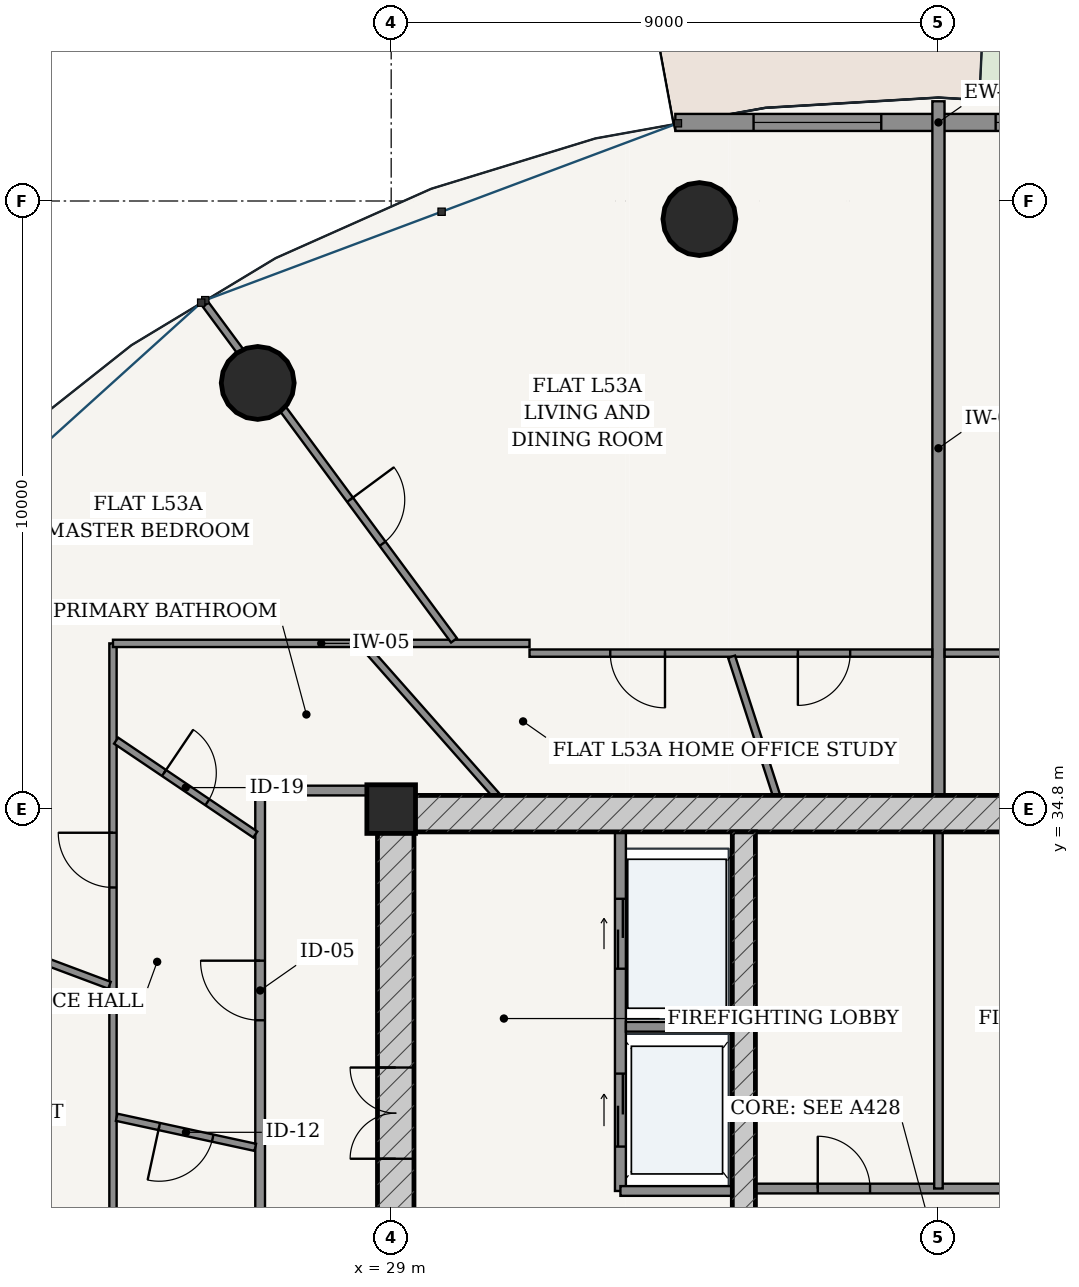
"""IFC4 building model, lengths in metres.
Left out: names, types, materials, properties, quantities, classifications, styles, units other than length and angle.
Written with IfcOpenShell. Run it as: python <this file> out.ifc"""

import sys

from ifc_helpers import new_model, si_unit, direction, frame, frame_2d, origin, origin_2d, place, context, subcontext, project, spatial, rectangle, hollow_circle, extrude, source, transform, mapped, element, fill, save


model = new_model("IFC4")
c1 = context("Model", 3, precision=1e-05, world=origin(), true_north=direction((-0.2419218956, 0.970295726276)))
c2 = subcontext(c1, "Body", "Model", "MODEL_VIEW")
j1 = project(units=[si_unit("LENGTHUNIT", "METRE"), si_unit("PLANEANGLEUNIT", "RADIAN")], contexts=[c1])
p1 = place(None, origin())
s1 = spatial("IfcSite", under=j1, at=p1, CompositionType="ELEMENT")
p2 = place(p1, origin())
s2 = spatial("IfcBuilding", under=s1, at=p2, CompositionType="ELEMENT")
p3 = place(p2, frame((0.0, 0.0, 202.3)))
s3 = spatial("IfcBuildingStorey", under=s2, at=p3, CompositionType="ELEMENT", Elevation=202.3)
p4 = place(p3, frame((29.0, 34.8, 0.0), z_axis=(0.0, 0.0, 1.0), x_axis=(1.0, 0.0, 0.0)))
e1 = element("IfcColumn", 1, at=p4, inside=s3, PredefinedType="COLUMN", context=c2, shape_type="SweptSolid", body=[
    extrude(rectangle(XDim=0.8, YDim=0.8, at=origin_2d()), origin(), (0.0, 0.0, 1.0), 3.7),
])
p5 = place(p3, frame((28.775, 34.725, 0.0), z_axis=(0.0, 0.0, 1.0), x_axis=(1.0, 0.0, 0.0)))
e2 = element("IfcWall", 2, at=p5, inside=s3, PredefinedType="SHEAR", context=c2, shape_type="SweptSolid", body=[
    extrude(rectangle(XDim=18.45, YDim=0.6, at=frame_2d((9.225, 0.0))), origin(), (0.0, 0.0, 1.0), 3.435),
])
p6 = place(p3, frame((29.075, 19.175, 0.0), z_axis=(0.0, 0.0, 1.0), x_axis=(0.0, 1.0, 0.0)))
e3 = element("IfcWall", 3, at=p6, inside=s3, PredefinedType="SHEAR", context=c2, shape_type="SweptSolid", body=[
    extrude(rectangle(XDim=15.25, YDim=0.6, at=frame_2d((7.625, 0.0))), origin(), (0.0, 0.0, 1.0), 3.435),
])
p7 = place(p6, frame((9.875, 0.0, 0.0)))
e4 = element("IfcOpeningElement", 4, at=p7, cuts=e3, PredefinedType="OPENING", context=c2, shape_type="SweptSolid", body=[
    extrude(rectangle(XDim=1.5, YDim=2.2, at=frame_2d((0.75, 1.1))), frame((0.0, 0.31, 0.0), z_axis=(0.0, -1.0, 0.0), x_axis=(1.0, 0.0, 0.0)), (0.0, 0.0, 1.0), 0.62),
])
p8 = place(p3, frame((34.8, 19.175, 0.0), z_axis=(0.0, 0.0, 1.0), x_axis=(0.0, 1.0, 0.0)))
e5 = element("IfcWall", 5, at=p8, inside=s3, PredefinedType="SHEAR", context=c2, shape_type="SweptSolid", body=[
    extrude(rectangle(XDim=15.25, YDim=0.38, at=frame_2d((7.625, 0.0))), origin(), (0.0, 0.0, 1.0), 3.435),
])
p9 = place(p8, frame((7.8, 0.0, 0.0)))
e6 = element("IfcOpeningElement", 6, at=p9, cuts=e5, PredefinedType="OPENING", context=c2, shape_type="SweptSolid", body=[
    extrude(rectangle(XDim=1.05, YDim=2.15, at=frame_2d((0.525, 1.075))), frame((0.0, 0.2, 0.0), z_axis=(0.0, -1.0, 0.0), x_axis=(1.0, 0.0, 0.0)), (0.0, 0.0, 1.0), 0.4),
])
for number, where, z_axis, x_axis in (
    (7, (34.069, 44.503, 0.0), (0.0, 0.0, 1.0), (1.0, 0.0, 0.0)),
    (8, (26.805, 41.808, 0.0), (0.0, 0.0, 1.0), (1.0, 0.0, 0.0)),
):
    element("IfcColumn", number, at=place(p3, frame(where, z_axis=z_axis, x_axis=x_axis)), inside=s3, PredefinedType="COLUMN", context=c2, shape_type="SweptSolid", body=[
        extrude(hollow_circle(Radius=0.6, WallThickness=0.038, at=origin_2d()), origin(), (0.0, 0.0, 1.0), 3.7),
    ])
p10 = place(p3, frame((42.327, 46.092, 0.0), z_axis=(0.0, 0.0, 1.0), x_axis=(-1.0, 0.0, 0.0)))
e9 = element("IfcWall", 9, at=p10, inside=s3, PredefinedType="SOLIDWALL", context=c2, shape_type="SweptSolid", body=[
    extrude(rectangle(XDim=8.654, YDim=0.28, at=frame_2d((4.327, 0.0))), origin(), (0.0, 0.0, 1.0), 3.435),
])
p11 = place(p10, frame((1.287, 0.0, 0.85)))
e10 = element("IfcOpeningElement", 10, at=p11, cuts=e9, PredefinedType="OPENING", context=c2, shape_type="SweptSolid", body=[
    extrude(rectangle(XDim=2.1, YDim=1.95, at=frame_2d((1.05, 0.975))), frame((0.0, 0.15, 0.0), z_axis=(0.0, -1.0, 0.0), x_axis=(1.0, 0.0, 0.0)), (0.0, 0.0, 1.0), 0.3),
])
p12 = place(p10, frame((5.268, 0.0, 0.85)))
e11 = element("IfcOpeningElement", 11, at=p12, cuts=e9, PredefinedType="OPENING", context=c2, shape_type="SweptSolid", body=[
    extrude(rectangle(XDim=2.1, YDim=1.95, at=frame_2d((1.05, 0.975))), frame((0.0, 0.15, 0.0), z_axis=(0.0, -1.0, 0.0), x_axis=(1.0, 0.0, 0.0)), (0.0, 0.0, 1.0), 0.3),
])
p13 = place(p3, frame((32.77, 28.52, 0.0), z_axis=(0.0, 0.0, 1.0), x_axis=(0.0, 1.0, 0.0)))
e12 = element("IfcWall", 12, at=p13, inside=s3, PredefinedType="PARTITIONING", context=c2, shape_type="SweptSolid", body=[
    extrude(rectangle(XDim=5.905, YDim=0.18, at=frame_2d((2.953, 0.0))), origin(), (0.0, 0.0, 1.0), 3.435),
])
p14 = place(p13, frame((3.655, 0.0, 0.0)))
e13 = element("IfcOpeningElement", 13, at=p14, cuts=e12, PredefinedType="OPENING", context=c2, shape_type="SweptSolid", body=[
    extrude(rectangle(XDim=1.15, YDim=2.2, at=frame_2d((0.575, 1.1))), frame((0.0, 0.1, 0.0), z_axis=(0.0, -1.0, 0.0), x_axis=(1.0, 0.0, 0.0)), (0.0, 0.0, 1.0), 0.2),
])
p15 = place(p13, frame((0.73, 0.0, 0.0)))
e14 = element("IfcOpeningElement", 14, at=p15, cuts=e12, PredefinedType="OPENING", context=c2, shape_type="SweptSolid", body=[
    extrude(rectangle(XDim=1.2, YDim=2.25, at=frame_2d((0.6, 1.125))), frame((0.0, 0.1, 0.0), z_axis=(0.0, -1.0, 0.0), x_axis=(1.0, 0.0, 0.0)), (0.0, 0.0, 1.0), 0.2),
])
p16 = place(p3, frame((32.86, 31.22, 0.0), z_axis=(0.0, 0.0, 1.0), x_axis=(1.0, 0.0, 0.0)))
e15 = element("IfcWall", 15, at=p16, inside=s3, PredefinedType="PARTITIONING", context=c2, shape_type="SweptSolid", body=[
    extrude(rectangle(XDim=1.75, YDim=0.16, at=frame_2d((0.875, 0.0))), origin(), (0.0, 0.0, 1.0), 3.435),
])
p17 = place(p3, frame((32.77, 28.52, 0.0), z_axis=(0.0, 0.0, 1.0), x_axis=(1.0, 0.0, 0.0)))
e16 = element("IfcWall", 16, at=p17, inside=s3, PredefinedType="PARTITIONING", context=c2, shape_type="SweptSolid", body=[
    extrude(rectangle(XDim=1.84, YDim=0.16, at=frame_2d((0.92, 0.0))), origin(), (0.0, 0.0, 1.0), 3.435),
])
p18 = place(p3, frame((34.99, 28.56, 0.0), z_axis=(0.0, 0.0, 1.0), x_axis=(1.0, 0.0, 0.0)))
e17 = element("IfcWall", 17, at=p18, inside=s3, PredefinedType="PARTITIONING", context=c2, shape_type="SweptSolid", body=[
    extrude(rectangle(XDim=6.02, YDim=0.16, at=frame_2d((3.01, 0.0))), origin(), (0.0, 0.0, 1.0), 3.435),
])
p19 = place(p18, frame((1.025, 0.0, 0.0)))
e18 = element("IfcOpeningElement", 18, at=p19, cuts=e17, PredefinedType="OPENING", context=c2, shape_type="SweptSolid", body=[
    extrude(rectangle(XDim=0.86, YDim=2.1, at=frame_2d((0.43, 1.05))), frame((0.0, 0.09, 0.0), z_axis=(0.0, -1.0, 0.0), x_axis=(1.0, 0.0, 0.0)), (0.0, 0.0, 1.0), 0.18),
])
p20 = place(p18, frame((4.14, 0.0, 0.0)))
e19 = element("IfcOpeningElement", 19, at=p20, cuts=e17, PredefinedType="OPENING", context=c2, shape_type="SweptSolid", body=[
    extrude(rectangle(XDim=0.85, YDim=2.1, at=frame_2d((0.425, 1.05))), frame((0.0, 0.09, 0.0), z_axis=(0.0, -1.0, 0.0), x_axis=(1.0, 0.0, 0.0)), (0.0, 0.0, 1.0), 0.18),
])
p21 = place(p3, frame((38.0, 28.56, 0.0), z_axis=(0.0, 0.0, 1.0), x_axis=(0.0, 1.0, 0.0)))
e20 = element("IfcWall", 20, at=p21, inside=s3, PredefinedType="PARTITIONING", context=c2, shape_type="SweptSolid", body=[
    extrude(rectangle(XDim=5.865, YDim=0.14, at=frame_2d((2.933, 0.0))), origin(), (0.0, 0.0, 1.0), 3.435),
])
p22 = place(p3, frame((26.845, 24.4, 0.0), z_axis=(0.0, 0.0, 1.0), x_axis=(0.0, 1.0, 0.0)))
e21 = element("IfcWall", 21, at=p22, inside=s3, PredefinedType="PARTITIONING", context=c2, shape_type="SweptSolid", body=[
    extrude(rectangle(XDim=10.625, YDim=0.16, at=frame_2d((5.312, 0.0))), origin(), (0.0, 0.0, 1.0), 2.951),
])
p23 = place(p22, frame((6.927, 0.0, 0.0)))
e22 = element("IfcOpeningElement", 22, at=p23, cuts=e21, PredefinedType="OPENING", context=c2, shape_type="SweptSolid", body=[
    extrude(rectangle(XDim=0.98, YDim=2.2, at=frame_2d((0.49, 1.1))), frame((0.0, 0.09, 0.0), z_axis=(0.0, -1.0, 0.0), x_axis=(1.0, 0.0, 0.0)), (0.0, 0.0, 1.0), 0.18),
])
p24 = place(p3, frame((26.845, 35.105, 0.0), z_axis=(0.0, 0.0, 1.0), x_axis=(1.0, 0.0, 0.0)))
e23 = element("IfcWall", 23, at=p24, inside=s3, PredefinedType="PARTITIONING", context=c2, shape_type="SweptSolid", body=[
    extrude(rectangle(XDim=1.93, YDim=0.16, at=frame_2d((0.965, 0.0))), origin(), (0.0, 0.0, 1.0), 3.435),
])
p25 = place(p3, frame((38.0, 35.027, 0.0), z_axis=(0.0, 0.0, 1.0), x_axis=(0.0, 1.0, 0.0)))
e24 = element("IfcWall", 24, at=p25, inside=s3, PredefinedType="PARTITIONING", context=c2, shape_type="SweptSolid", body=[
    extrude(rectangle(XDim=11.413, YDim=0.2, at=frame_2d((5.707, 0.0))), origin(), (0.0, 0.0, 1.0), 2.52),
])
p26 = place(p3, frame((24.425, 21.9, 0.0), z_axis=(0.0, 0.0, 1.0), x_axis=(0.0, 1.0, 0.0)))
e25 = element("IfcWall", 25, at=p26, inside=s3, PredefinedType="PARTITIONING", context=c2, shape_type="SweptSolid", body=[
    extrude(rectangle(XDim=15.625, YDim=0.12, at=frame_2d((7.812, 0.0))), origin(), (0.0, 0.0, 1.0), 2.951),
])
p27 = place(p26, frame((11.611, 0.0, 0.0)))
e26 = element("IfcOpeningElement", 26, at=p27, cuts=e25, PredefinedType="OPENING", context=c2, shape_type="SweptSolid", body=[
    extrude(rectangle(XDim=0.9, YDim=2.15, at=frame_2d((0.45, 1.075))), frame((0.0, 0.07, 0.0), z_axis=(0.0, -1.0, 0.0), x_axis=(1.0, 0.0, 0.0)), (0.0, 0.0, 1.0), 0.14),
])
p28 = place(p3, frame((24.425, 37.525, 0.0), z_axis=(0.0, 0.0, 1.0), x_axis=(1.0, 0.0, 0.0)))
e27 = element("IfcWall", 27, at=p28, inside=s3, PredefinedType="PARTITIONING", context=c2, shape_type="SweptSolid", body=[
    extrude(rectangle(XDim=6.85, YDim=0.12, at=frame_2d((3.425, 0.0))), origin(), (0.0, 0.0, 1.0), 2.951),
])
p29 = place(p3, frame((31.275, 37.365, 0.0), z_axis=(0.0, 0.0, 1.0), x_axis=(1.0, 0.0, 0.0)))
e28 = element("IfcWall", 28, at=p29, inside=s3, PredefinedType="PARTITIONING", context=c2, shape_type="SweptSolid", body=[
    extrude(rectangle(XDim=6.623, YDim=0.12, at=frame_2d((3.312, 0.0))), origin(), (0.0, 0.0, 1.0), 2.951),
])
p30 = place(p29, frame((4.413, 0.0, 0.0)))
e29 = element("IfcOpeningElement", 29, at=p30, cuts=e28, PredefinedType="OPENING", context=c2, shape_type="SweptSolid", body=[
    extrude(rectangle(XDim=0.86, YDim=2.15, at=frame_2d((0.43, 1.075))), frame((0.0, 0.07, 0.0), z_axis=(0.0, -1.0, 0.0), x_axis=(1.0, 0.0, 0.0)), (0.0, 0.0, 1.0), 0.14),
])
p31 = place(p29, frame((1.328, 0.0, 0.0)))
e30 = element("IfcOpeningElement", 30, at=p31, cuts=e28, PredefinedType="OPENING", context=c2, shape_type="SweptSolid", body=[
    extrude(rectangle(XDim=0.9, YDim=2.15, at=frame_2d((0.45, 1.075))), frame((0.0, 0.07, 0.0), z_axis=(0.0, -1.0, 0.0), x_axis=(1.0, 0.0, 0.0)), (0.0, 0.0, 1.0), 0.14),
])
p32 = place(p3, frame((30.033, 37.575, 0.0), z_axis=(0.0, 0.0, 1.0), x_axis=(-0.59452500855, 0.804077119565, 0.0)))
e31 = element("IfcWall", 31, at=p32, inside=s3, PredefinedType="PARTITIONING", context=c2, shape_type="SweptSolid", body=[
    extrude(rectangle(XDim=6.867, YDim=0.12, at=frame_2d((3.434, 0.0))), origin(), (0.0, 0.0, 1.0), 2.951),
])
p33 = place(p32, frame((1.976, 0.0, 0.0)))
e32 = element("IfcOpeningElement", 32, at=p33, cuts=e31, PredefinedType="OPENING", context=c2, shape_type="SweptSolid", body=[
    extrude(rectangle(XDim=0.9, YDim=2.15, at=frame_2d((0.45, 1.075))), frame((0.0, 0.07, 0.0), z_axis=(0.0, -1.0, 0.0), x_axis=(1.0, 0.0, 0.0)), (0.0, 0.0, 1.0), 0.14),
])
p34 = place(p3, frame((24.367, 31.903, 0.0), z_axis=(0.0, 0.0, 1.0), x_axis=(-0.936544604529, 0.350548432785, 0.0)))
e33 = element("IfcWall", 33, at=p34, inside=s3, PredefinedType="PARTITIONING", context=c2, shape_type="SweptSolid", body=[
    extrude(rectangle(XDim=6.887, YDim=0.12, at=frame_2d((3.444, 0.0))), origin(), (0.0, 0.0, 1.0), 2.951),
])
p35 = place(p34, frame((2.994, 0.0, 0.0)))
e34 = element("IfcOpeningElement", 34, at=p35, cuts=e33, PredefinedType="OPENING", context=c2, shape_type="SweptSolid", body=[
    extrude(rectangle(XDim=0.9, YDim=2.15, at=frame_2d((0.45, 1.075))), frame((0.0, 0.07, 0.0), z_axis=(0.0, -1.0, 0.0), x_axis=(1.0, 0.0, 0.0)), (0.0, 0.0, 1.0), 0.14),
])
p36 = place(p3, frame((35.336, 35.027, 0.0), z_axis=(0.0, 0.0, 1.0), x_axis=(-0.308083476138, 0.951359328398, 0.0)))
e35 = element("IfcWall", 35, at=p36, inside=s3, PredefinedType="PARTITIONING", context=c2, shape_type="SweptSolid", body=[
    extrude(rectangle(XDim=2.396, YDim=0.12, at=frame_2d((1.198, 0.0))), origin(), (0.0, 0.0, 1.0), 2.52),
])
p37 = place(p3, frame((30.726, 35.027, 0.0), z_axis=(0.0, 0.0, 1.0), x_axis=(-0.662398427862, 0.749151735475, 0.0)))
e36 = element("IfcWall", 36, at=p37, inside=s3, PredefinedType="PARTITIONING", context=c2, shape_type="SweptSolid", body=[
    extrude(rectangle(XDim=3.273, YDim=0.12, at=frame_2d((1.636, 0.0))), origin(), (0.0, 0.0, 1.0), 3.435),
])
p38 = place(p3, frame((26.765, 34.381, 0.0), z_axis=(0.0, 0.0, 1.0), x_axis=(-0.828908126494, 0.55938476725, 0.0)))
e37 = element("IfcWall", 37, at=p38, inside=s3, PredefinedType="PARTITIONING", context=c2, shape_type="SweptSolid", body=[
    extrude(rectangle(XDim=2.761, YDim=0.12, at=frame_2d((1.38, 0.0))), origin(), (0.0, 0.0, 1.0), 3.11),
])
p39 = place(p38, frame((0.95, 0.0, 0.0)))
e38 = element("IfcOpeningElement", 38, at=p39, cuts=e37, PredefinedType="OPENING", context=c2, shape_type="SweptSolid", body=[
    extrude(rectangle(XDim=0.86, YDim=2.15, at=frame_2d((0.43, 1.075))), frame((0.0, 0.07, 0.0), z_axis=(0.0, -1.0, 0.0), x_axis=(1.0, 0.0, 0.0)), (0.0, 0.0, 1.0), 0.14),
])
p40 = place(p3, frame((26.765, 29.238, 0.0), z_axis=(0.0, 0.0, 1.0), x_axis=(-0.977275456013, 0.211973307458, 0.0)))
e39 = element("IfcWall", 39, at=p40, inside=s3, PredefinedType="PARTITIONING", context=c2, shape_type="SweptSolid", body=[
    extrude(rectangle(XDim=2.332, YDim=0.12, at=frame_2d((1.166, 0.0))), origin(), (0.0, 0.0, 1.0), 3.435),
])
p41 = place(p40, frame((0.716, 0.0, 0.0)))
e40 = element("IfcOpeningElement", 40, at=p41, cuts=e39, PredefinedType="OPENING", context=c2, shape_type="SweptSolid", body=[
    extrude(rectangle(XDim=0.9, YDim=2.15, at=frame_2d((0.45, 1.075))), frame((0.0, 0.07, 0.0), z_axis=(0.0, -1.0, 0.0), x_axis=(1.0, 0.0, 0.0)), (0.0, 0.0, 1.0), 0.14),
])
p42 = place(p3, frame((38.102, 37.365, 0.0), z_axis=(0.0, 0.0, 1.0), x_axis=(1.0, 0.0, 0.0)))
e41 = element("IfcWall", 41, at=p42, inside=s3, PredefinedType="PARTITIONING", context=c2, shape_type="SweptSolid", body=[
    extrude(rectangle(XDim=6.623, YDim=0.12, at=frame_2d((3.312, 0.0))), origin(), (0.0, 0.0, 1.0), 2.951),
])
p43 = place(p42, frame((5.06, 0.0, 0.0)))
e42 = element("IfcOpeningElement", 42, at=p43, cuts=e41, PredefinedType="OPENING", context=c2, shape_type="SweptSolid", body=[
    extrude(rectangle(XDim=0.9, YDim=2.15, at=frame_2d((0.45, 1.075))), frame((0.0, 0.07, 0.0), z_axis=(0.0, -1.0, 0.0), x_axis=(1.0, 0.0, 0.0)), (0.0, 0.0, 1.0), 0.14),
])
p44 = place(p42, frame((2.04, 0.0, 0.0)))
e43 = element("IfcOpeningElement", 43, at=p44, cuts=e41, PredefinedType="OPENING", context=c2, shape_type="SweptSolid", body=[
    extrude(rectangle(XDim=0.9, YDim=2.15, at=frame_2d((0.45, 1.075))), frame((0.0, 0.07, 0.0), z_axis=(0.0, -1.0, 0.0), x_axis=(1.0, 0.0, 0.0)), (0.0, 0.0, 1.0), 0.14),
])
m1 = source(origin(), c2, "Body", "SweptSolid", [
    extrude(rectangle(XDim=2.1, YDim=1.95, at=frame_2d((1.05, 0.975))), frame((0.0, 0.03, 0.0), z_axis=(0.0, -1.0, 0.0), x_axis=(1.0, 0.0, 0.0)), (0.0, 0.0, 1.0), 0.06),
])
p45 = place(p11, origin())
e44 = element("IfcWindow", 44, at=p45, inside=s3, PartitioningType="SINGLE_PANEL", PredefinedType="WINDOW", context=c2, shape_type="MappedRepresentation", body=[
    mapped(m1, transform((0.0, 0.0, 0.0), scale=1.0)),
])
fill(e10, e44)
p46 = place(p12, origin())
e45 = element("IfcWindow", 45, at=p46, inside=s3, PartitioningType="SINGLE_PANEL", PredefinedType="WINDOW", context=c2, shape_type="MappedRepresentation", body=[
    mapped(m1, transform((0.0, 0.0, 0.0), scale=1.0)),
])
fill(e11, e45)
m2 = source(origin(), c2, "Body", "SweptSolid", [
    extrude(rectangle(XDim=1.5, YDim=2.2, at=frame_2d((0.75, 1.1))), frame((0.0, 0.025, 0.0), z_axis=(0.0, -1.0, 0.0), x_axis=(1.0, 0.0, 0.0)), (0.0, 0.0, 1.0), 0.05),
])
p47 = place(p7, origin())
e46 = element("IfcDoor", 46, at=p47, inside=s3, OperationType="DOUBLE_DOOR_SINGLE_SWING", PredefinedType="DOOR", context=c2, shape_type="MappedRepresentation", body=[
    mapped(m2, transform((0.0, 0.0, 0.0), scale=1.0)),
])
fill(e4, e46)
m3 = source(origin(), c2, "Body", "SweptSolid", [
    extrude(rectangle(XDim=0.86, YDim=2.1, at=frame_2d((0.43, 1.05))), frame((0.0, 0.025, 0.0), z_axis=(0.0, -1.0, 0.0), x_axis=(1.0, 0.0, 0.0)), (0.0, 0.0, 1.0), 0.05),
])
p48 = place(p19, origin())
e47 = element("IfcDoor", 47, at=p48, inside=s3, OperationType="SINGLE_SWING_LEFT", PredefinedType="DOOR", context=c2, shape_type="MappedRepresentation", body=[
    mapped(m3, transform((0.0, 0.0, 0.0), scale=1.0)),
])
fill(e18, e47)
m4 = source(origin(), c2, "Body", "SweptSolid", [
    extrude(rectangle(XDim=1.15, YDim=2.2, at=frame_2d((0.575, 1.1))), frame((0.0, 0.025, 0.0), z_axis=(0.0, -1.0, 0.0), x_axis=(1.0, 0.0, 0.0)), (0.0, 0.0, 1.0), 0.05),
])
p49 = place(p14, origin())
e48 = element("IfcDoor", 48, at=p49, inside=s3, OperationType="DOUBLE_DOOR_SLIDING", PredefinedType="DOOR", context=c2, shape_type="MappedRepresentation", body=[
    mapped(m4, transform((0.0, 0.0, 0.0), scale=1.0)),
])
fill(e13, e48)
m5 = source(origin(), c2, "Body", "SweptSolid", [
    extrude(rectangle(XDim=1.2, YDim=2.25, at=frame_2d((0.6, 1.125))), frame((0.0, 0.025, 0.0), z_axis=(0.0, -1.0, 0.0), x_axis=(1.0, 0.0, 0.0)), (0.0, 0.0, 1.0), 0.05),
])
p50 = place(p15, origin())
e49 = element("IfcDoor", 49, at=p50, inside=s3, OperationType="DOUBLE_DOOR_SLIDING", PredefinedType="DOOR", context=c2, shape_type="MappedRepresentation", body=[
    mapped(m5, transform((0.0, 0.0, 0.0), scale=1.0)),
])
fill(e14, e49)
m6 = source(origin(), c2, "Body", "SweptSolid", [
    extrude(rectangle(XDim=0.98, YDim=2.2, at=frame_2d((0.49, 1.1))), frame((0.0, 0.025, 0.0), z_axis=(0.0, -1.0, 0.0), x_axis=(1.0, 0.0, 0.0)), (0.0, 0.0, 1.0), 0.05),
])
p51 = place(p23, origin())
e50 = element("IfcDoor", 50, at=p51, inside=s3, OperationType="SINGLE_SWING_RIGHT", PredefinedType="DOOR", context=c2, shape_type="MappedRepresentation", body=[
    mapped(m6, transform((0.0, 0.0, 0.0), scale=1.0)),
])
fill(e22, e50)
m7 = source(origin(), c2, "Body", "SweptSolid", [
    extrude(rectangle(XDim=0.86, YDim=2.15, at=frame_2d((0.43, 1.075))), frame((0.0, 0.025, 0.0), z_axis=(0.0, -1.0, 0.0), x_axis=(1.0, 0.0, 0.0)), (0.0, 0.0, 1.0), 0.05),
])
p52 = place(p39, frame((0.86, 0.0, 0.0), z_axis=(0.0, 0.0, 1.0), x_axis=(-1.0, 0.0, 0.0)))
e51 = element("IfcDoor", 51, at=p52, inside=s3, OperationType="SINGLE_SWING_LEFT", PredefinedType="DOOR", context=c2, shape_type="MappedRepresentation", body=[
    mapped(m7, transform((0.0, 0.0, 0.0), scale=1.0)),
])
fill(e38, e51)
m8 = source(origin(), c2, "Body", "SweptSolid", [
    extrude(rectangle(XDim=0.9, YDim=2.15, at=frame_2d((0.45, 1.075))), frame((0.0, 0.025, 0.0), z_axis=(0.0, -1.0, 0.0), x_axis=(1.0, 0.0, 0.0)), (0.0, 0.0, 1.0), 0.05),
])
p53 = place(p41, origin())
e52 = element("IfcDoor", 52, at=p53, inside=s3, OperationType="SINGLE_SWING_RIGHT", PredefinedType="DOOR", context=c2, shape_type="MappedRepresentation", body=[
    mapped(m8, transform((0.0, 0.0, 0.0), scale=1.0)),
])
fill(e40, e52)
p54 = place(p27, origin())
e53 = element("IfcDoor", 53, at=p54, inside=s3, OperationType="SINGLE_SWING_RIGHT", PredefinedType="DOOR", context=c2, shape_type="MappedRepresentation", body=[
    mapped(m8, transform((0.0, 0.0, 0.0), scale=1.0)),
])
fill(e26, e53)
p55 = place(p33, frame((0.9, 0.0, 0.0), z_axis=(0.0, 0.0, 1.0), x_axis=(-1.0, 0.0, 0.0)))
e54 = element("IfcDoor", 54, at=p55, inside=s3, OperationType="SINGLE_SWING_LEFT", PredefinedType="DOOR", context=c2, shape_type="MappedRepresentation", body=[
    mapped(m8, transform((0.0, 0.0, 0.0), scale=1.0)),
])
fill(e32, e54)
p56 = place(p30, frame((0.86, 0.0, 0.0), z_axis=(0.0, 0.0, 1.0), x_axis=(-1.0, 0.0, 0.0)))
e55 = element("IfcDoor", 55, at=p56, inside=s3, OperationType="SINGLE_SWING_RIGHT", PredefinedType="DOOR", context=c2, shape_type="MappedRepresentation", body=[
    mapped(m7, transform((0.0, 0.0, 0.0), scale=1.0)),
])
fill(e29, e55)
p57 = place(p31, frame((0.9, 0.0, 0.0), z_axis=(0.0, 0.0, 1.0), x_axis=(-1.0, 0.0, 0.0)))
e56 = element("IfcDoor", 56, at=p57, inside=s3, OperationType="SINGLE_SWING_LEFT", PredefinedType="DOOR", context=c2, shape_type="MappedRepresentation", body=[
    mapped(m8, transform((0.0, 0.0, 0.0), scale=1.0)),
])
fill(e30, e56)
save(model, sys.argv[1])
